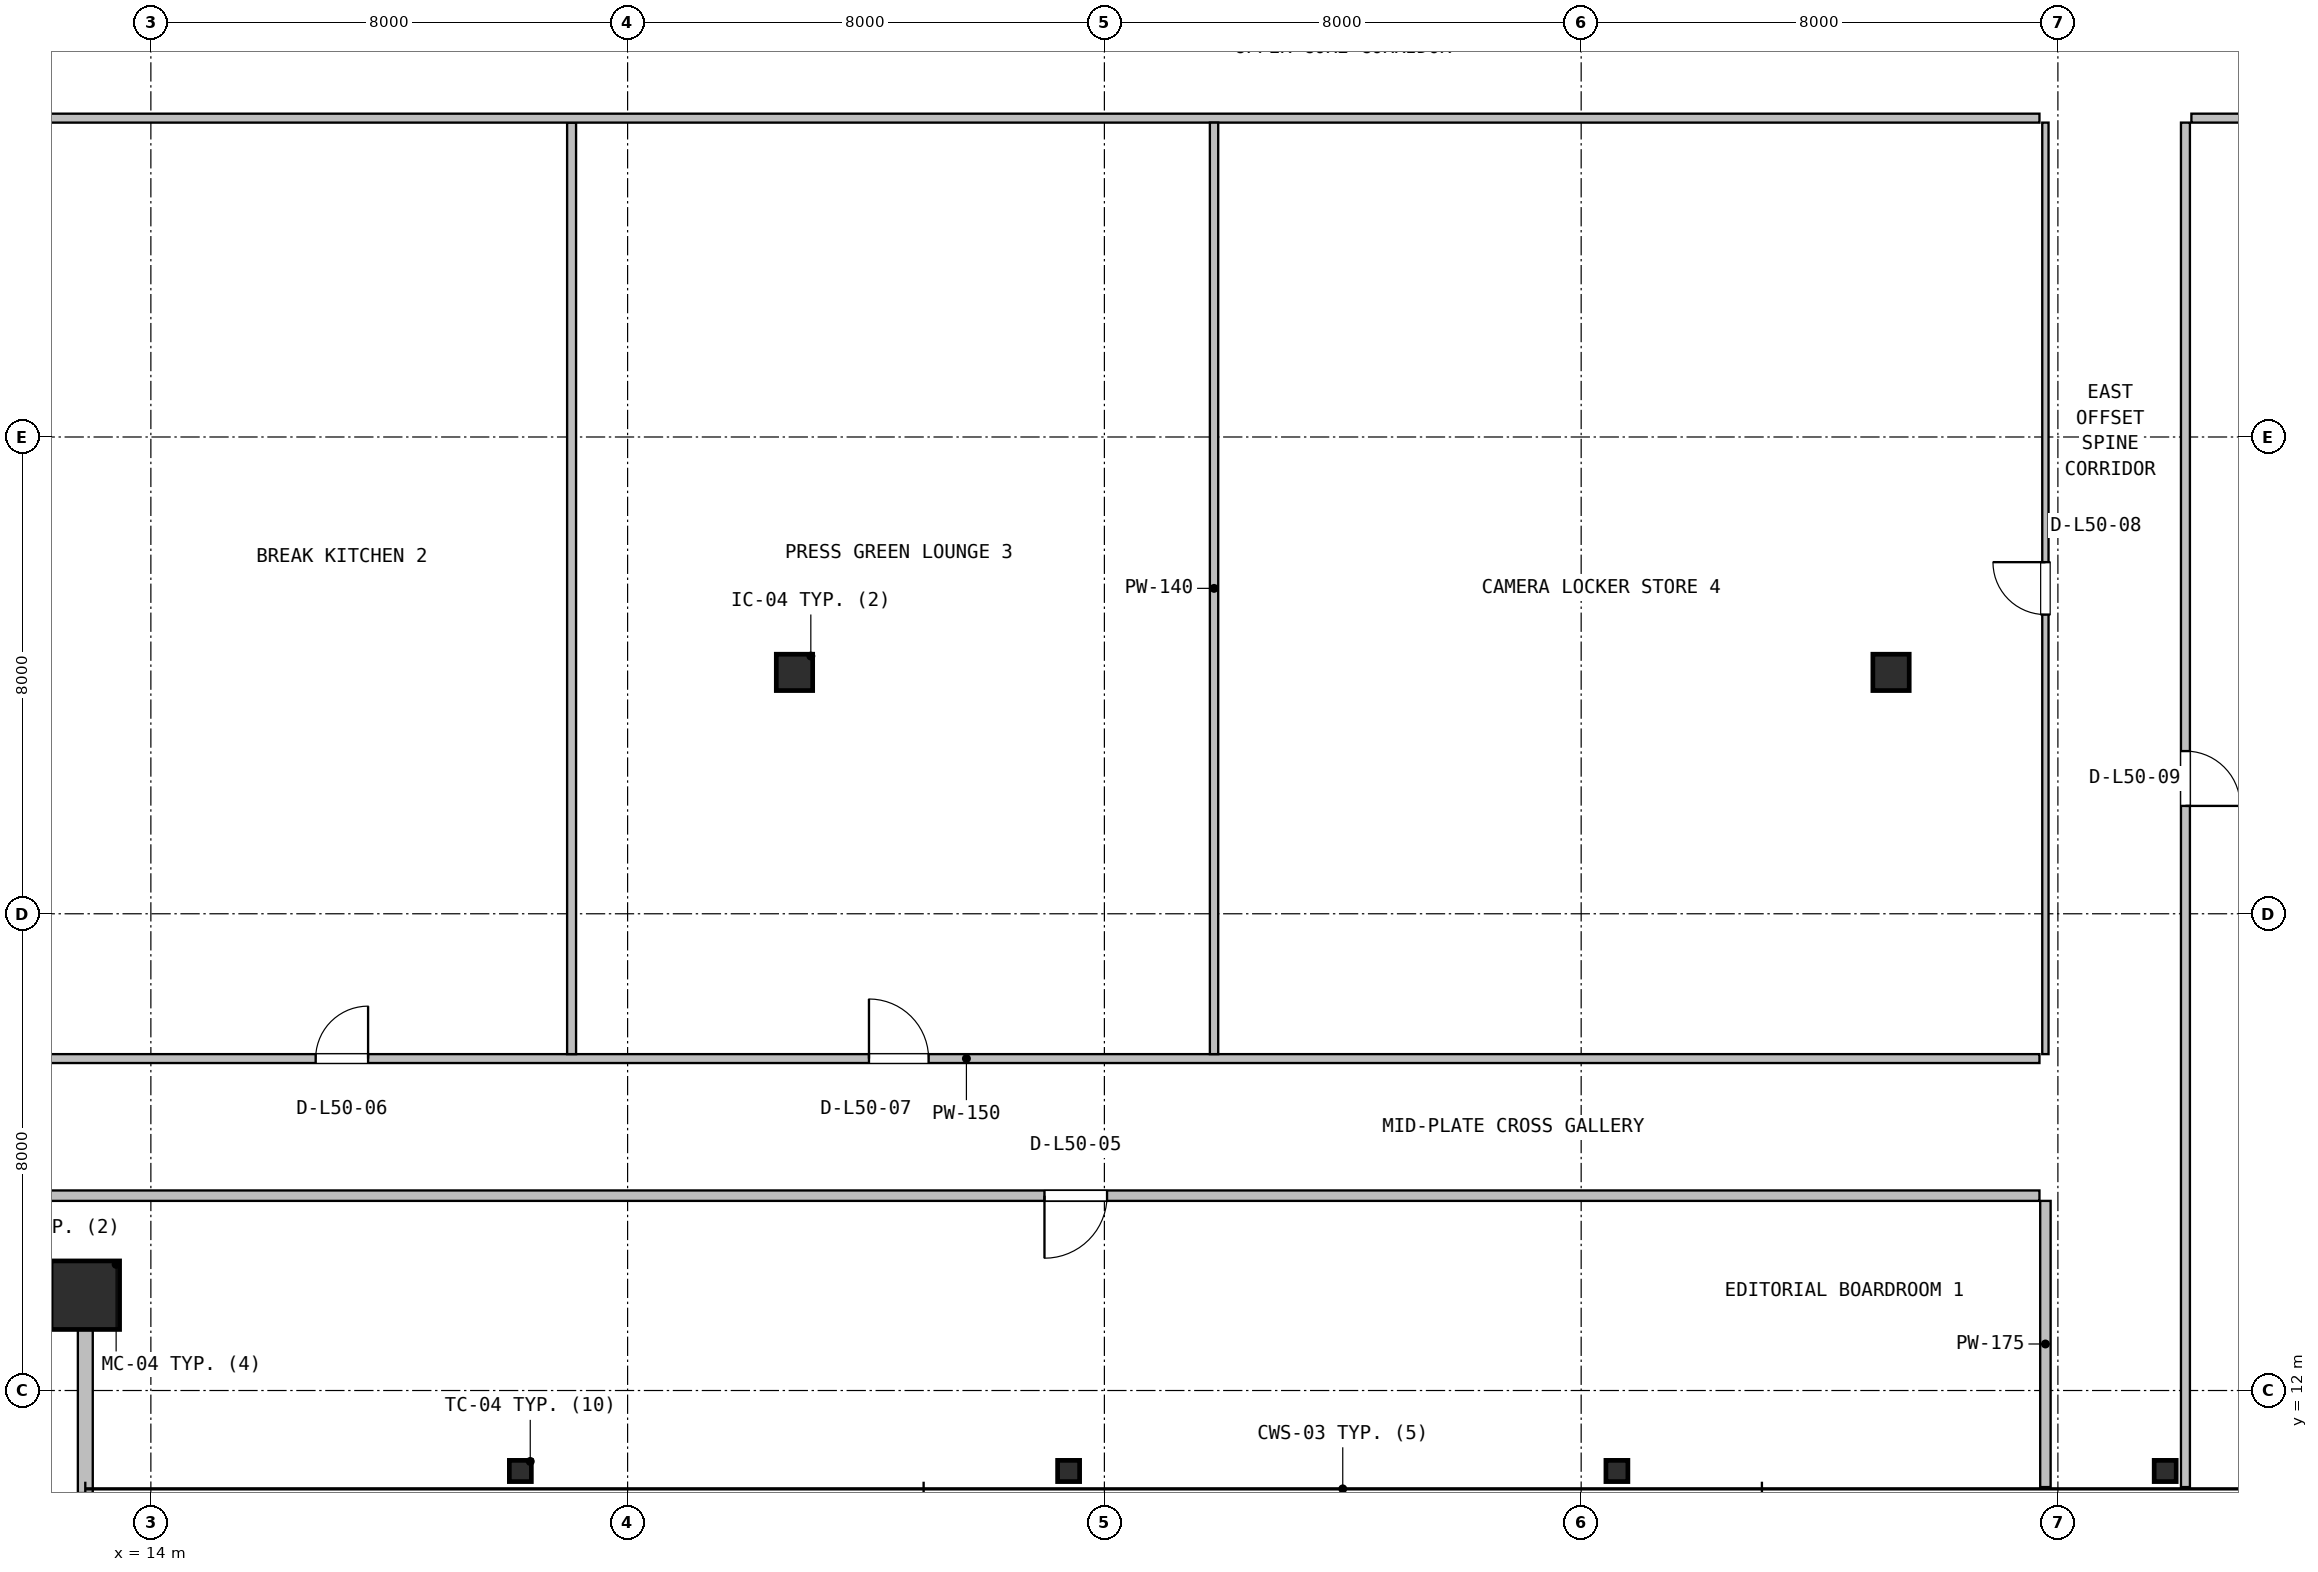
"""IFC4 building model, lengths in metres.
Left out: names, types, materials, properties, quantities, classifications, styles, units other than length and angle.
Written with IfcOpenShell. Run it as: python <this file> out.ifc"""

import sys

from ifc_helpers import new_model, si_unit, direction, frame, frame_2d, origin, origin_2d, place, context, subcontext, project, spatial, rectangle, hollow_rectangle, hollow_circle, i_section, extrude, source, transform, mapped, element, fill, save


model = new_model("IFC4")
c1 = context("Model", 3, precision=1e-05, world=origin(), true_north=direction((0.0, 1.0)))
c2 = subcontext(c1, "Body", "Model", "MODEL_VIEW")
j1 = project(units=[si_unit("LENGTHUNIT", "METRE"), si_unit("PLANEANGLEUNIT", "RADIAN")], contexts=[c1])
p1 = place(None, origin())
s1 = spatial("IfcSite", under=j1, at=p1, CompositionType="ELEMENT")
p2 = place(p1, origin())
s2 = spatial("IfcBuilding", under=s1, at=p2, CompositionType="ELEMENT")
p3 = place(p2, frame((0.0, 0.0, 203.6)))
s3 = spatial("IfcBuildingStorey", under=s2, at=p3, CompositionType="ELEMENT", Elevation=203.6)
m1 = source(origin(), c2, "Body", "SweptSolid", [
    extrude(hollow_rectangle(XDim=1.15, YDim=1.15, WallThickness=0.045, at=origin_2d()), origin(), (0.0, 0.0, 1.0), 3.8),
])
p4 = place(p3, frame((12.9, 13.6, 0.0), z_axis=(0.0, 0.0, 1.0), x_axis=(1.0, 0.0, 0.0)))
e1 = element("IfcColumn", 1, at=p4, inside=s3, PredefinedType="COLUMN", context=c2, shape_type="MappedRepresentation", body=[
    mapped(m1, transform((0.0, 0.0, 0.0), x_axis=(1.0, 0.0, 0.0), y_axis=(0.0, 1.0, 0.0), z_axis=(0.0, 0.0, 1.0), scale=1.0)),
])
m2 = source(origin(), c2, "Body", "SweptSolid", [
    extrude(i_section(OverallWidth=0.369, OverallDepth=0.356, WebThickness=0.011, FlangeThickness=0.018, FilletRadius=0.016, at=origin_2d()), origin(), (0.0, 0.0, 1.0), 3.8),
])
for number, where, z_axis, x_axis in (
    (2, (20.2, 10.65, 0.0), (0.0, 0.0, 1.0), (1.0, 0.0, 0.0)),
    (3, (29.4, 10.65, 0.0), (0.0, 0.0, 1.0), (1.0, 0.0, 0.0)),
    (4, (38.6, 10.65, 0.0), (0.0, 0.0, 1.0), (1.0, 0.0, 0.0)),
    (5, (47.8, 10.65, 0.0), (0.0, 0.0, 1.0), (1.0, 0.0, 0.0)),
):
    element("IfcColumn", number, at=place(p3, frame(where, z_axis=z_axis, x_axis=x_axis)), inside=s3, PredefinedType="COLUMN", context=c2, shape_type="MappedRepresentation", body=[
        mapped(m2, transform((0.0, 0.0, 0.0), x_axis=(1.0, 0.0, 0.0), y_axis=(0.0, 1.0, 0.0), z_axis=(0.0, 0.0, 1.0), scale=1.0)),
    ])
m3 = source(origin(), c2, "Body", "SweptSolid", [
    extrude(hollow_circle(Radius=0.305, WallThickness=0.025, at=origin_2d()), origin(), (0.0, 0.0, 1.0), 3.8),
])
for number, where, z_axis, x_axis in (
    (6, (24.8, 24.05, 0.0), (0.0, 0.0, 1.0), (1.0, 0.0, 0.0)),
    (7, (43.2, 24.05, 0.0), (0.0, 0.0, 1.0), (1.0, 0.0, 0.0)),
):
    element("IfcColumn", number, at=place(p3, frame(where, z_axis=z_axis, x_axis=x_axis)), inside=s3, PredefinedType="COLUMN", context=c2, shape_type="MappedRepresentation", body=[
        mapped(m3, transform((0.0, 0.0, 0.0), x_axis=(1.0, 0.0, 0.0), y_axis=(0.0, 1.0, 0.0), z_axis=(0.0, 0.0, 1.0), scale=1.0)),
    ])
p5 = place(p3, frame((12.9, 10.28, 0.0), z_axis=(0.0, 0.0, 1.0), x_axis=(0.0, 1.0, 0.0)))
e8 = element("IfcWall", 8, at=p5, inside=s3, PredefinedType="SOLIDWALL", context=c2, shape_type="SweptSolid", body=[
    extrude(rectangle(XDim=3.4, YDim=0.25, at=frame_2d((1.7, 0.0))), origin(), (0.0, 0.0, 1.0), 3.171),
])
p6 = place(p3, frame((45.79, 10.38, 0.0), z_axis=(0.0, 0.0, 1.0), x_axis=(0.0, 1.0, 0.0)))
e9 = element("IfcWall", 9, at=p6, inside=s3, PredefinedType="PARTITIONING", context=c2, shape_type="SweptSolid", body=[
    extrude(rectangle(XDim=4.802, YDim=0.175, at=frame_2d((2.401, 0.0))), origin(), (0.0, 0.0, 1.0), 3.171),
])
p7 = place(p3, frame((9.68, 15.27, 0.0), z_axis=(0.0, 0.0, 1.0), x_axis=(1.0, 0.0, 0.0)))
e10 = element("IfcWall", 10, at=p7, inside=s3, PredefinedType="PARTITIONING", context=c2, shape_type="SweptSolid", body=[
    extrude(rectangle(XDim=36.01, YDim=0.175, at=frame_2d((18.005, 0.0))), origin(), (0.0, 0.0, 1.0), 2.908),
])
p8 = place(p7, frame((19.315, 0.0, 0.0)))
e11 = element("IfcOpeningElement", 11, at=p8, cuts=e10, PredefinedType="OPENING", context=c2, shape_type="SweptSolid", body=[
    extrude(rectangle(XDim=1.05, YDim=2.1, at=frame_2d((0.525, 1.05))), frame((0.0, 0.098, 0.0), z_axis=(0.0, -1.0, 0.0), x_axis=(1.0, 0.0, 0.0)), (0.0, 0.0, 1.0), 0.195),
])
p9 = place(p3, frame((9.68, 17.57, 0.0), z_axis=(0.0, 0.0, 1.0), x_axis=(1.0, 0.0, 0.0)))
e12 = element("IfcWall", 12, at=p9, inside=s3, PredefinedType="PARTITIONING", context=c2, shape_type="SweptSolid", body=[
    extrude(rectangle(XDim=36.01, YDim=0.15, at=frame_2d((18.005, 0.0))), origin(), (0.0, 0.0, 1.0), 2.908),
])
p10 = place(p9, frame((7.085, 0.0, 0.0)))
e13 = element("IfcOpeningElement", 13, at=p10, cuts=e12, PredefinedType="OPENING", context=c2, shape_type="SweptSolid", body=[
    extrude(rectangle(XDim=0.88, YDim=2.06, at=frame_2d((0.44, 1.03))), frame((0.0, 0.085, 0.0), z_axis=(0.0, -1.0, 0.0), x_axis=(1.0, 0.0, 0.0)), (0.0, 0.0, 1.0), 0.17),
])
p11 = place(p9, frame((16.37, 0.0, 0.0)))
e14 = element("IfcOpeningElement", 14, at=p11, cuts=e12, PredefinedType="OPENING", context=c2, shape_type="SweptSolid", body=[
    extrude(rectangle(XDim=1.0, YDim=2.1, at=frame_2d((0.5, 1.05))), frame((0.0, 0.085, 0.0), z_axis=(0.0, -1.0, 0.0), x_axis=(1.0, 0.0, 0.0)), (0.0, 0.0, 1.0), 0.17),
])
p12 = place(p3, frame((21.06, 17.645, 0.0), z_axis=(0.0, 0.0, 1.0), x_axis=(0.0, 1.0, 0.0)))
e15 = element("IfcWall", 15, at=p12, inside=s3, PredefinedType="PARTITIONING", context=c2, shape_type="SweptSolid", body=[
    extrude(rectangle(XDim=15.63, YDim=0.15, at=frame_2d((7.815, 0.0))), origin(), (0.0, 0.0, 1.0), 3.222),
])
p13 = place(p3, frame((9.68, 33.35, 0.0), z_axis=(0.0, 0.0, 1.0), x_axis=(1.0, 0.0, 0.0)))
e16 = element("IfcWall", 16, at=p13, inside=s3, PredefinedType="PARTITIONING", context=c2, shape_type="SweptSolid", body=[
    extrude(rectangle(XDim=36.01, YDim=0.15, at=frame_2d((18.005, 0.0))), origin(), (0.0, 0.0, 1.0), 2.908),
])
p14 = place(p3, frame((31.84, 17.645, 0.0), z_axis=(0.0, 0.0, 1.0), x_axis=(0.0, 1.0, 0.0)))
e17 = element("IfcWall", 17, at=p14, inside=s3, PredefinedType="PARTITIONING", context=c2, shape_type="SweptSolid", body=[
    extrude(rectangle(XDim=15.63, YDim=0.14, at=frame_2d((7.815, 0.0))), origin(), (0.0, 0.0, 1.0), 2.908),
])
p15 = place(p3, frame((45.79, 17.645, 0.0), z_axis=(0.0, 0.0, 1.0), x_axis=(0.0, 1.0, 0.0)))
e18 = element("IfcWall", 18, at=p15, inside=s3, PredefinedType="PARTITIONING", context=c2, shape_type="SweptSolid", body=[
    extrude(rectangle(XDim=15.63, YDim=0.105, at=frame_2d((7.815, 0.0))), origin(), (0.0, 0.0, 1.0), 3.222),
])
p16 = place(p15, frame((7.375, 0.0, 0.0)))
e19 = element("IfcOpeningElement", 19, at=p16, cuts=e18, PredefinedType="OPENING", context=c2, shape_type="SweptSolid", body=[
    extrude(rectangle(XDim=0.88, YDim=2.06, at=frame_2d((0.44, 1.03))), frame((0.0, 0.062, 0.0), z_axis=(0.0, -1.0, 0.0), x_axis=(1.0, 0.0, 0.0)), (0.0, 0.0, 1.0), 0.125),
])
p17 = place(p3, frame((48.24, 33.35, 0.0), z_axis=(0.0, 0.0, 1.0), x_axis=(1.0, 0.0, 0.0)))
e20 = element("IfcWall", 20, at=p17, inside=s3, PredefinedType="PARTITIONING", context=c2, shape_type="SweptSolid", body=[
    extrude(rectangle(XDim=10.08, YDim=0.15, at=frame_2d((5.04, 0.0))), origin(), (0.0, 0.0, 1.0), 3.171),
])
p18 = place(p3, frame((48.14, 10.38, 0.0), z_axis=(0.0, 0.0, 1.0), x_axis=(0.0, 1.0, 0.0)))
e21 = element("IfcWall", 21, at=p18, inside=s3, PredefinedType="PARTITIONING", context=c2, shape_type="SweptSolid", body=[
    extrude(rectangle(XDim=22.895, YDim=0.15, at=frame_2d((11.448, 0.0))), origin(), (0.0, 0.0, 1.0), 3.171),
])
p19 = place(p18, frame((11.43, 0.0, 0.0)))
e22 = element("IfcOpeningElement", 22, at=p19, cuts=e21, PredefinedType="OPENING", context=c2, shape_type="SweptSolid", body=[
    extrude(rectangle(XDim=0.92, YDim=2.08, at=frame_2d((0.46, 1.04))), frame((0.0, 0.085, 0.0), z_axis=(0.0, -1.0, 0.0), x_axis=(1.0, 0.0, 0.0)), (0.0, 0.0, 1.0), 0.17),
])
m4 = source(origin(), c2, "Body", "SweptSolid", [
    extrude(rectangle(XDim=1.05, YDim=2.1, at=frame_2d((0.525, 1.05))), frame((0.0, 0.025, 0.0), z_axis=(0.0, -1.0, 0.0), x_axis=(1.0, 0.0, 0.0)), (0.0, 0.0, 1.0), 0.05),
])
p20 = place(p8, frame((1.05, 0.0, 0.0), z_axis=(0.0, 0.0, 1.0), x_axis=(-1.0, 0.0, 0.0)))
e23 = element("IfcDoor", 23, at=p20, inside=s3, OperationType="SINGLE_SWING_LEFT", PredefinedType="DOOR", context=c2, shape_type="MappedRepresentation", body=[
    mapped(m4, transform((0.0, 0.0, 0.0), x_axis=(1.0, 0.0, 0.0), y_axis=(0.0, 1.0, 0.0), z_axis=(0.0, 0.0, 1.0), scale=1.0)),
])
fill(e11, e23)
m5 = source(origin(), c2, "Body", "SweptSolid", [
    extrude(rectangle(XDim=0.88, YDim=2.06, at=frame_2d((0.44, 1.03))), frame((0.0, 0.025, 0.0), z_axis=(0.0, -1.0, 0.0), x_axis=(1.0, 0.0, 0.0)), (0.0, 0.0, 1.0), 0.05),
])
p21 = place(p10, origin())
e24 = element("IfcDoor", 24, at=p21, inside=s3, OperationType="SINGLE_SWING_RIGHT", PredefinedType="DOOR", context=c2, shape_type="MappedRepresentation", body=[
    mapped(m5, transform((0.0, 0.0, 0.0), x_axis=(1.0, 0.0, 0.0), y_axis=(0.0, 1.0, 0.0), z_axis=(0.0, 0.0, 1.0), scale=1.0)),
])
fill(e13, e24)
m6 = source(origin(), c2, "Body", "SweptSolid", [
    extrude(rectangle(XDim=1.0, YDim=2.1, at=frame_2d((0.5, 1.05))), frame((0.0, 0.025, 0.0), z_axis=(0.0, -1.0, 0.0), x_axis=(1.0, 0.0, 0.0)), (0.0, 0.0, 1.0), 0.05),
])
p22 = place(p11, origin())
e25 = element("IfcDoor", 25, at=p22, inside=s3, OperationType="SINGLE_SWING_LEFT", PredefinedType="DOOR", context=c2, shape_type="MappedRepresentation", body=[
    mapped(m6, transform((0.0, 0.0, 0.0), x_axis=(1.0, 0.0, 0.0), y_axis=(0.0, 1.0, 0.0), z_axis=(0.0, 0.0, 1.0), scale=1.0)),
])
fill(e14, e25)
p23 = place(p16, origin())
e26 = element("IfcDoor", 26, at=p23, inside=s3, OperationType="SINGLE_SWING_RIGHT", PredefinedType="DOOR", context=c2, shape_type="MappedRepresentation", body=[
    mapped(m5, transform((0.0, 0.0, 0.0), x_axis=(1.0, 0.0, 0.0), y_axis=(0.0, 1.0, 0.0), z_axis=(0.0, 0.0, 1.0), scale=1.0)),
])
fill(e19, e26)
m7 = source(origin(), c2, "Body", "SweptSolid", [
    extrude(rectangle(XDim=0.92, YDim=2.08, at=frame_2d((0.46, 1.04))), frame((0.0, 0.025, 0.0), z_axis=(0.0, -1.0, 0.0), x_axis=(1.0, 0.0, 0.0)), (0.0, 0.0, 1.0), 0.05),
])
p24 = place(p19, frame((0.92, 0.0, 0.0), z_axis=(0.0, 0.0, 1.0), x_axis=(-1.0, 0.0, 0.0)))
e27 = element("IfcDoor", 27, at=p24, inside=s3, OperationType="SINGLE_SWING_LEFT", PredefinedType="DOOR", context=c2, shape_type="MappedRepresentation", body=[
    mapped(m7, transform((0.0, 0.0, 0.0), x_axis=(1.0, 0.0, 0.0), y_axis=(0.0, 1.0, 0.0), z_axis=(0.0, 0.0, 1.0), scale=1.0)),
])
fill(e22, e27)
save(model, sys.argv[1])
